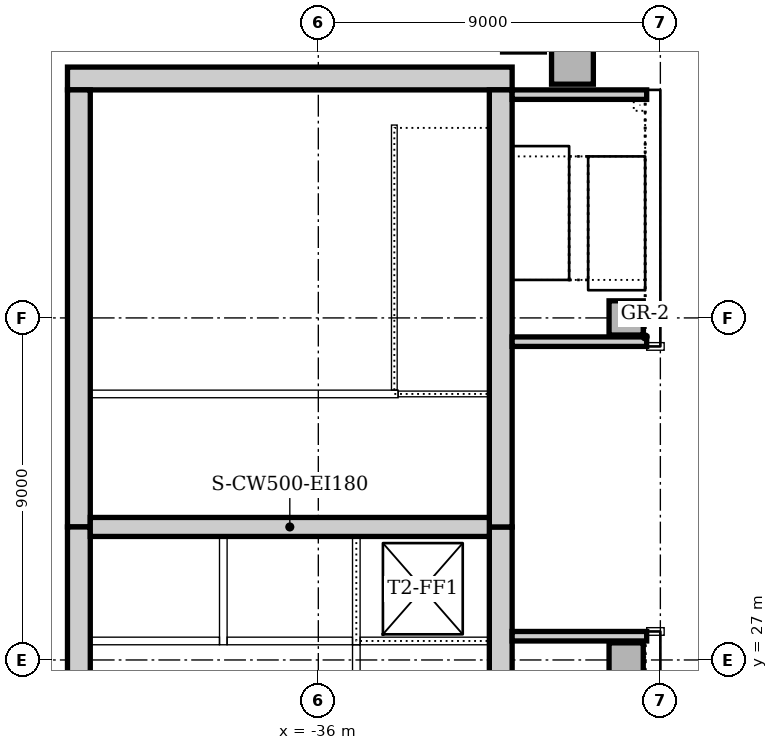
"""IFC4 building model, lengths in metres.
Left out: names, types, materials, properties, quantities, classifications, styles, units other than length and angle.
Written with IfcOpenShell. Run it as: python <this file> out.ifc"""

import sys

from ifc_helpers import new_model, si_unit, direction, frame, frame_2d, origin, origin_2d, place, context, subcontext, project, spatial, rectangle, extrude, element, fill, save


model = new_model("IFC4")
c1 = context("Model", 3, precision=1e-05, world=origin(), true_north=direction((0.0, 1.0)))
c2 = subcontext(c1, "Body", "Model", "MODEL_VIEW")
j1 = project(units=[si_unit("LENGTHUNIT", "METRE"), si_unit("PLANEANGLEUNIT", "RADIAN")], contexts=[c1])
p1 = place(None, origin())
s1 = spatial("IfcSite", under=j1, at=p1, CompositionType="ELEMENT")
p2 = place(p1, origin())
s2 = spatial("IfcBuilding", under=s1, at=p2, CompositionType="ELEMENT")
p3 = place(p2, frame((0.0, 0.0, -9.5)))
s3 = spatial("IfcBuildingStorey", under=s2, at=p3, CompositionType="ELEMENT", Elevation=-9.5)
p4 = place(p3, frame((-30.9, 42.3, 0.0), z_axis=(0.0, 0.0, 1.0), x_axis=(-1.0, 0.0, 0.0)))
e1 = element("IfcWall", 1, at=p4, inside=s3, PredefinedType="SOLIDWALL", context=c2, shape_type="SweptSolid", body=[
    extrude(rectangle(XDim=11.7, YDim=0.6, at=frame_2d((5.85, 0.0))), origin(), (0.0, 0.0, 1.0), 4.5),
])
p5 = place(p3, frame((-31.2, 21.0, 0.0), z_axis=(0.0, 0.0, 1.0), x_axis=(0.0, 1.0, 0.0)))
e2 = element("IfcWall", 2, at=p5, inside=s3, PredefinedType="SOLIDWALL", context=c2, shape_type="SweptSolid", body=[
    extrude(rectangle(XDim=9.5, YDim=0.6, at=frame_2d((4.75, 0.0))), origin(), (0.0, 0.0, 1.0), 4.5),
])
p6 = place(p5, frame((5.25, 0.0, 0.0)))
e3 = element("IfcOpeningElement", 3, at=p6, cuts=e2, PredefinedType="OPENING", context=c2, shape_type="SweptSolid", body=[
    extrude(rectangle(XDim=1.0, YDim=2.1, at=frame_2d((0.5, 1.05))), frame((0.0, 0.31, 0.0), z_axis=(0.0, -1.0, 0.0), x_axis=(1.0, 0.0, 0.0)), (0.0, 0.0, 1.0), 0.62),
])
p7 = place(p3, frame((-31.2, 30.5, 0.0), z_axis=(0.0, 0.0, 1.0), x_axis=(0.0, 1.0, 0.0)))
e4 = element("IfcWall", 4, at=p7, inside=s3, PredefinedType="SOLIDWALL", context=c2, shape_type="SweptSolid", body=[
    extrude(rectangle(XDim=11.5, YDim=0.6, at=frame_2d((5.75, 0.0))), origin(), (0.0, 0.0, 1.0), 4.5),
])
p8 = place(p7, frame((0.85, 0.0, 0.0)))
e5 = element("IfcOpeningElement", 5, at=p8, cuts=e4, PredefinedType="OPENING", context=c2, shape_type="SweptSolid", body=[
    extrude(rectangle(XDim=1.8, YDim=2.1, at=frame_2d((0.9, 1.05))), frame((0.0, 0.31, 0.0), z_axis=(0.0, -1.0, 0.0), x_axis=(1.0, 0.0, 0.0)), (0.0, 0.0, 1.0), 0.62),
])
p9 = place(p3, frame((-42.3, 42.0, 0.0), z_axis=(0.0, 0.0, 1.0), x_axis=(0.0, -1.0, 0.0)))
e6 = element("IfcWall", 6, at=p9, inside=s3, PredefinedType="SOLIDWALL", context=c2, shape_type="SweptSolid", body=[
    extrude(rectangle(XDim=11.5, YDim=0.6, at=frame_2d((5.75, 0.0))), origin(), (0.0, 0.0, 1.0), 4.5),
])
p10 = place(p9, frame((8.85, 0.0, 0.0)))
e7 = element("IfcOpeningElement", 7, at=p10, cuts=e6, PredefinedType="OPENING", context=c2, shape_type="SweptSolid", body=[
    extrude(rectangle(XDim=1.8, YDim=2.1, at=frame_2d((0.9, 1.05))), frame((0.0, 0.31, 0.0), z_axis=(0.0, -1.0, 0.0), x_axis=(1.0, 0.0, 0.0)), (0.0, 0.0, 1.0), 0.62),
])
p11 = place(p3, frame((-42.3, 30.5, 0.0), z_axis=(0.0, 0.0, 1.0), x_axis=(0.0, -1.0, 0.0)))
e8 = element("IfcWall", 8, at=p11, inside=s3, PredefinedType="SOLIDWALL", context=c2, shape_type="SweptSolid", body=[
    extrude(rectangle(XDim=9.5, YDim=0.6, at=frame_2d((4.75, 0.0))), origin(), (0.0, 0.0, 1.0), 4.5),
])
p12 = place(p3, frame((-42.0, 30.5, 0.0), z_axis=(0.0, 0.0, 1.0), x_axis=(1.0, 0.0, 0.0)))
e9 = element("IfcWall", 9, at=p12, inside=s3, PredefinedType="SOLIDWALL", context=c2, shape_type="SweptSolid", body=[
    extrude(rectangle(XDim=10.5, YDim=0.5, at=frame_2d((5.25, 0.0))), origin(), (0.0, 0.0, 1.0), 4.5),
])
p13 = place(p3, frame((-27.36, 27.625, 0.0), z_axis=(0.0, 0.0, 1.0), x_axis=(-1.0, 0.0, 0.0)))
e10 = element("IfcWall", 10, at=p13, inside=s3, PredefinedType="SOLIDWALL", context=c2, shape_type="SweptSolid", body=[
    extrude(rectangle(XDim=3.54, YDim=0.25, at=frame_2d((1.77, 0.0))), origin(), (0.0, 0.0, 1.0), 4.5),
])
p14 = place(p13, frame((1.69, 0.0, 0.0)))
e11 = element("IfcOpeningElement", 11, at=p14, cuts=e10, PredefinedType="OPENING", context=c2, shape_type="SweptSolid", body=[
    extrude(rectangle(XDim=1.1, YDim=2.1, at=frame_2d((0.55, 1.05))), frame((0.0, 0.135, 0.0), z_axis=(0.0, -1.0, 0.0), x_axis=(1.0, 0.0, 0.0)), (0.0, 0.0, 1.0), 0.27),
])
p15 = place(p3, frame((-30.9, 35.375, 0.0), z_axis=(0.0, 0.0, 1.0), x_axis=(1.0, 0.0, 0.0)))
e12 = element("IfcWall", 12, at=p15, inside=s3, PredefinedType="SOLIDWALL", context=c2, shape_type="SweptSolid", body=[
    extrude(rectangle(XDim=3.54, YDim=0.25, at=frame_2d((1.77, 0.0))), origin(), (0.0, 0.0, 1.0), 4.5),
])
p16 = place(p15, frame((0.75, 0.0, 0.0)))
e13 = element("IfcOpeningElement", 13, at=p16, cuts=e12, PredefinedType="OPENING", context=c2, shape_type="SweptSolid", body=[
    extrude(rectangle(XDim=1.1, YDim=2.1, at=frame_2d((0.55, 1.05))), frame((0.0, 0.135, 0.0), z_axis=(0.0, -1.0, 0.0), x_axis=(1.0, 0.0, 0.0)), (0.0, 0.0, 1.0), 0.27),
])
p17 = place(p3, frame((-27.36, 41.875, 0.0), z_axis=(0.0, 0.0, 1.0), x_axis=(-1.0, 0.0, 0.0)))
e14 = element("IfcWall", 14, at=p17, inside=s3, PredefinedType="SOLIDWALL", context=c2, shape_type="SweptSolid", body=[
    extrude(rectangle(XDim=3.54, YDim=0.25, at=frame_2d((1.77, 0.0))), origin(), (0.0, 0.0, 1.0), 4.5),
])
for number, where, z_axis, x_axis in (
    (15, (-29.313, 42.7, 0.0), (0.0, 0.0, 1.0), (1.0, 0.0, 0.0)),
    (16, (-30.602, 43.547, 0.0), (0.0, 0.0, 1.0), (1.0, 0.0, 0.0)),
):
    element("IfcColumn", number, at=place(p3, frame(where, z_axis=z_axis, x_axis=x_axis)), inside=s3, PredefinedType="COLUMN", context=c2, shape_type="SweptSolid", body=[
        extrude(rectangle(XDim=1.1, YDim=1.1, at=origin_2d()), origin(), (0.0, 0.0, 1.0), 4.15),
    ])
for number, where, z_axis, x_axis in (
    (17, (-27.9, 27.0, 0.0), (0.0, 0.0, 1.0), (1.0, 0.0, 0.0)),
    (18, (-27.9, 36.0, 0.0), (0.0, 0.0, 1.0), (1.0, 0.0, 0.0)),
):
    element("IfcColumn", number, at=place(p3, frame(where, z_axis=z_axis, x_axis=x_axis)), inside=s3, PredefinedType="COLUMN", context=c2, shape_type="SweptSolid", body=[
        extrude(rectangle(XDim=0.9, YDim=0.9, at=origin_2d()), origin(), (0.0, 0.0, 1.0), 4.5),
    ])
p18 = place(p3, frame((-38.5, 27.4, 0.0), z_axis=(0.0, 0.0, 1.0), x_axis=(0.0, 1.0, 0.0)))
e19 = element("IfcWall", 19, at=p18, inside=s3, PredefinedType="SOLIDWALL", context=c2, shape_type="SweptSolid", body=[
    extrude(rectangle(XDim=2.85, YDim=0.2, at=frame_2d((1.425, 0.0))), origin(), (0.0, 0.0, 1.0), 4.5),
])
p19 = place(p3, frame((-42.0, 27.5, 0.0), z_axis=(0.0, 0.0, 1.0), x_axis=(1.0, 0.0, 0.0)))
e20 = element("IfcWall", 20, at=p19, inside=s3, PredefinedType="SOLIDWALL", context=c2, shape_type="SweptSolid", body=[
    extrude(rectangle(XDim=3.4, YDim=0.2, at=frame_2d((1.7, 0.0))), origin(), (0.0, 0.0, 1.0), 4.5),
])
p20 = place(p3, frame((-35.0, 27.4, 0.0), z_axis=(0.0, 0.0, 1.0), x_axis=(0.0, 1.0, 0.0)))
e21 = element("IfcWall", 21, at=p20, inside=s3, PredefinedType="SOLIDWALL", context=c2, shape_type="SweptSolid", body=[
    extrude(rectangle(XDim=2.85, YDim=0.2, at=frame_2d((1.425, 0.0))), origin(), (0.0, 0.0, 1.0), 4.5),
])
p21 = place(p3, frame((-38.4, 27.5, 0.0), z_axis=(0.0, 0.0, 1.0), x_axis=(1.0, 0.0, 0.0)))
e22 = element("IfcWall", 22, at=p21, inside=s3, PredefinedType="SOLIDWALL", context=c2, shape_type="SweptSolid", body=[
    extrude(rectangle(XDim=3.3, YDim=0.2, at=frame_2d((1.65, 0.0))), origin(), (0.0, 0.0, 1.0), 4.5),
])
p22 = place(p3, frame((-34.9, 27.5, 0.0), z_axis=(0.0, 0.0, 1.0), x_axis=(1.0, 0.0, 0.0)))
e23 = element("IfcWall", 23, at=p22, inside=s3, PredefinedType="SOLIDWALL", context=c2, shape_type="SweptSolid", body=[
    extrude(rectangle(XDim=3.4, YDim=0.2, at=frame_2d((1.7, 0.0))), origin(), (0.0, 0.0, 1.0), 4.5),
])
p23 = place(p22, frame((1.1, 0.0, 0.0)))
e24 = element("IfcOpeningElement", 24, at=p23, cuts=e23, PredefinedType="OPENING", context=c2, shape_type="SweptSolid", body=[
    extrude(rectangle(XDim=1.1, YDim=2.1, at=frame_2d((0.55, 1.05))), frame((0.0, 0.11, 0.0), z_axis=(0.0, -1.0, 0.0), x_axis=(1.0, 0.0, 0.0)), (0.0, 0.0, 1.0), 0.22),
])
p24 = place(p3, frame((-35.0, 24.1, 0.0), z_axis=(0.0, 0.0, 1.0), x_axis=(0.0, 1.0, 0.0)))
e25 = element("IfcWall", 25, at=p24, inside=s3, PredefinedType="SOLIDWALL", context=c2, shape_type="SweptSolid", body=[
    extrude(rectangle(XDim=3.3, YDim=0.2, at=frame_2d((1.65, 0.0))), origin(), (0.0, 0.0, 1.0), 4.5),
])
for number, where, z_axis, x_axis in (
    (26, (-27.36, 27.75, 0.0), (0.0, 0.0, 1.0), (1.0, 0.0, 0.0)),
    (27, (-26.9, 35.25, 0.0), (0.0, 0.0, 1.0), (-1.0, 0.0, 0.0)),
):
    element("IfcWall", number, at=place(p3, frame(where, z_axis=z_axis, x_axis=x_axis)), inside=s3, PredefinedType="SOLIDWALL", context=c2, shape_type="SweptSolid", body=[
        extrude(rectangle(XDim=0.46, YDim=0.2, at=frame_2d((0.23, 0.0))), origin(), (0.0, 0.0, 1.0), 4.5),
    ])
p25 = place(p3, frame((-33.9, 34.0, 0.0), z_axis=(0.0, 0.0, 1.0), x_axis=(-1.0, 0.0, 0.0)))
e28 = element("IfcWall", 28, at=p25, inside=s3, PredefinedType="SOLIDWALL", context=c2, shape_type="SweptSolid", body=[
    extrude(rectangle(XDim=8.1, YDim=0.2, at=frame_2d((4.05, 0.0))), origin(), (0.0, 0.0, 1.0), 4.5),
])
p26 = place(p3, frame((-33.9, 34.0, 0.0), z_axis=(0.0, 0.0, 1.0), x_axis=(1.0, 0.0, 0.0)))
e29 = element("IfcWall", 29, at=p26, inside=s3, PredefinedType="SOLIDWALL", context=c2, shape_type="SweptSolid", body=[
    extrude(rectangle(XDim=2.4, YDim=0.15, at=frame_2d((1.2, 0.0))), origin(), (0.0, 0.0, 1.0), 4.5),
])
p27 = place(p3, frame((-34.0, 41.075, 0.0), z_axis=(0.0, 0.0, 1.0), x_axis=(0.0, -1.0, 0.0)))
e30 = element("IfcWall", 30, at=p27, inside=s3, PredefinedType="SOLIDWALL", context=c2, shape_type="SweptSolid", body=[
    extrude(rectangle(XDim=6.975, YDim=0.15, at=frame_2d((3.487, 0.0))), origin(), (0.0, 0.0, 1.0), 4.5),
])
p28 = place(p23, origin())
e31 = element("IfcDoor", 31, at=p28, inside=s3, OperationType="SLIDING_TO_LEFT", PredefinedType="DOOR", context=c2, shape_type="SweptSolid", body=[
    extrude(rectangle(XDim=1.1, YDim=2.1, at=frame_2d((0.55, 1.05))), frame((0.0, 0.025, 0.0), z_axis=(0.0, -1.0, 0.0), x_axis=(1.0, 0.0, 0.0)), (0.0, 0.0, 1.0), 0.05),
])
fill(e24, e31)
p29 = place(p6, frame((1.0, 0.0, 0.0), z_axis=(0.0, 0.0, 1.0), x_axis=(-1.0, 0.0, 0.0)))
e32 = element("IfcDoor", 32, at=p29, inside=s3, OperationType="SINGLE_SWING_LEFT", PredefinedType="DOOR", context=c2, shape_type="SweptSolid", body=[
    extrude(rectangle(XDim=1.0, YDim=2.1, at=frame_2d((0.5, 1.05))), frame((0.0, 0.025, 0.0), z_axis=(0.0, -1.0, 0.0), x_axis=(1.0, 0.0, 0.0)), (0.0, 0.0, 1.0), 0.05),
])
fill(e3, e32)
p30 = place(p14, origin())
e33 = element("IfcDoor", 33, at=p30, inside=s3, OperationType="SINGLE_SWING_RIGHT", PredefinedType="DOOR", context=c2, shape_type="SweptSolid", body=[
    extrude(rectangle(XDim=1.1, YDim=2.1, at=frame_2d((0.55, 1.05))), frame((0.0, 0.025, 0.0), z_axis=(0.0, -1.0, 0.0), x_axis=(1.0, 0.0, 0.0)), (0.0, 0.0, 1.0), 0.05),
])
fill(e11, e33)
p31 = place(p16, origin())
e34 = element("IfcDoor", 34, at=p31, inside=s3, OperationType="SINGLE_SWING_RIGHT", PredefinedType="DOOR", context=c2, shape_type="SweptSolid", body=[
    extrude(rectangle(XDim=1.1, YDim=2.1, at=frame_2d((0.55, 1.05))), frame((0.0, 0.025, 0.0), z_axis=(0.0, -1.0, 0.0), x_axis=(1.0, 0.0, 0.0)), (0.0, 0.0, 1.0), 0.05),
])
fill(e13, e34)
p32 = place(p8, origin())
e35 = element("IfcDoor", 35, at=p32, inside=s3, OperationType="DOUBLE_DOOR_SINGLE_SWING", PredefinedType="DOOR", context=c2, shape_type="SweptSolid", body=[
    extrude(rectangle(XDim=1.8, YDim=2.1, at=frame_2d((0.9, 1.05))), frame((0.0, 0.025, 0.0), z_axis=(0.0, -1.0, 0.0), x_axis=(1.0, 0.0, 0.0)), (0.0, 0.0, 1.0), 0.05),
])
fill(e5, e35)
p33 = place(p10, frame((1.8, 0.0, 0.0), z_axis=(0.0, 0.0, 1.0), x_axis=(-1.0, 0.0, 0.0)))
e36 = element("IfcDoor", 36, at=p33, inside=s3, OperationType="DOUBLE_DOOR_SINGLE_SWING", PredefinedType="DOOR", context=c2, shape_type="SweptSolid", body=[
    extrude(rectangle(XDim=1.8, YDim=2.1, at=frame_2d((0.9, 1.05))), frame((0.0, 0.025, 0.0), z_axis=(0.0, -1.0, 0.0), x_axis=(1.0, 0.0, 0.0)), (0.0, 0.0, 1.0), 0.05),
])
fill(e7, e36)
save(model, sys.argv[1])
